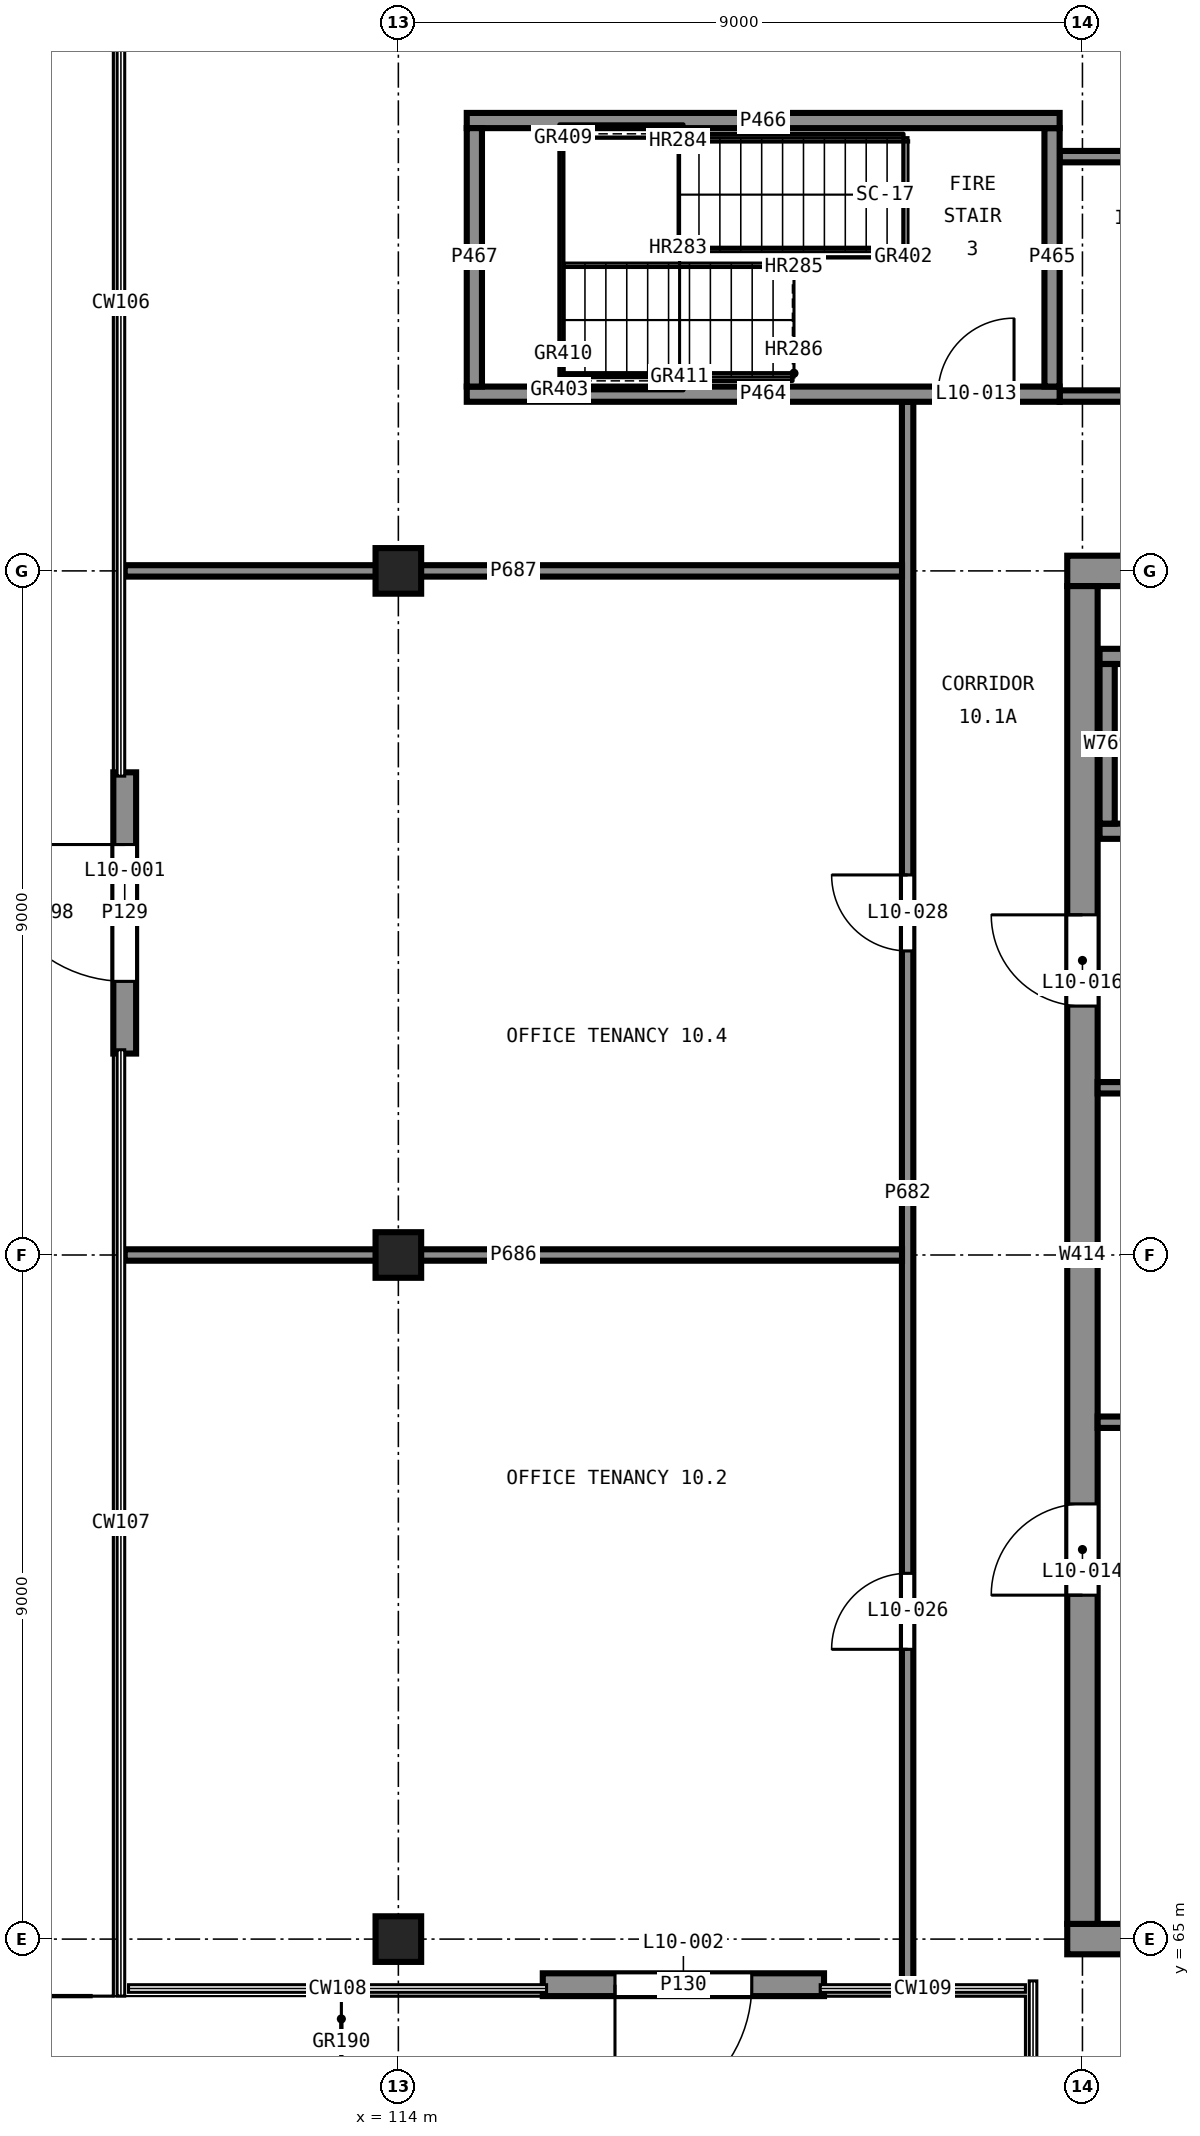
"""IFC4 building model, lengths in metres.
Left out: names, types, materials, properties, quantities, classifications, styles, units other than length and angle.
Written with IfcOpenShell. Run it as: python <this file> out.ifc"""

import sys

from ifc_helpers import new_model, si_unit, direction, frame, frame_2d, origin, origin_2d, place, context, subcontext, project, spatial, rectangle, extrude, element, fill, save


model = new_model("IFC4")
c1 = context("Model", 3, precision=1e-05, world=origin(), true_north=direction((0.0, 1.0)))
c2 = subcontext(c1, "Body", "Model", "MODEL_VIEW")
j1 = project(units=[si_unit("LENGTHUNIT", "METRE"), si_unit("PLANEANGLEUNIT", "RADIAN")], contexts=[c1])
p1 = place(None, origin())
s1 = spatial("IfcSite", under=j1, at=p1, CompositionType="ELEMENT")
p2 = place(p1, origin())
s2 = spatial("IfcBuilding", under=s1, at=p2, CompositionType="ELEMENT")
p3 = place(p2, frame((0.0, 0.0, 41.5)))
s3 = spatial("IfcBuildingStorey", under=s2, at=p3, CompositionType="ELEMENT", Elevation=41.5)
for number, where, z_axis, x_axis in (
    (1, (114.0, 65.0, 0.0), (0.0, 0.0, 1.0), (1.0, 0.0, 0.0)),
    (2, (114.0, 74.0, 0.0), (0.0, 0.0, 1.0), (1.0, 0.0, 0.0)),
    (3, (114.0, 83.0, 0.0), (0.0, 0.0, 1.0), (1.0, 0.0, 0.0)),
):
    element("IfcColumn", number, at=place(p3, frame(where, z_axis=z_axis, x_axis=x_axis)), inside=s3, PredefinedType="COLUMN", context=c2, shape_type="SweptSolid", body=[
        extrude(rectangle(XDim=0.6, YDim=0.6, at=origin_2d()), origin(), (0.0, 0.0, 1.0), 4.0),
    ])
for number, where, z_axis, x_axis in (
    (4, (122.8, 65.0, 0.0), (0.0, 0.0, 1.0), (1.0, 0.0, 0.0)),
    (5, (141.2, 83.0, 0.0), (0.0, 0.0, 1.0), (-1.0, 0.0, 0.0)),
):
    element("IfcWall", number, at=place(p3, frame(where, z_axis=z_axis, x_axis=x_axis)), inside=s3, PredefinedType="SHEAR", context=c2, shape_type="SweptSolid", body=[
        extrude(rectangle(XDim=18.4, YDim=0.4, at=frame_2d((9.2, 0.0))), origin(), (0.0, 0.0, 1.0), 4.0),
    ])
p4 = place(p3, frame((123.0, 82.8, 0.0), z_axis=(0.0, 0.0, 1.0), x_axis=(0.0, -1.0, 0.0)))
e6 = element("IfcWall", 6, at=p4, inside=s3, PredefinedType="SHEAR", context=c2, shape_type="SweptSolid", body=[
    extrude(rectangle(XDim=17.6, YDim=0.4, at=frame_2d((8.8, 0.0))), origin(), (0.0, 0.0, 1.0), 4.0),
])
p5 = place(p4, frame((12.075, 0.0, 0.0)))
e7 = element("IfcOpeningElement", 7, at=p5, cuts=e6, PredefinedType="OPENING", context=c2, shape_type="SweptSolid", body=[
    extrude(rectangle(XDim=1.2, YDim=2.1, at=frame_2d((0.6, 1.05))), frame((0.0, 0.21, 0.0), z_axis=(0.0, -1.0, 0.0), x_axis=(1.0, 0.0, 0.0)), (0.0, 0.0, 1.0), 0.42),
])
p6 = place(p4, frame((4.325, 0.0, 0.0)))
e8 = element("IfcOpeningElement", 8, at=p6, cuts=e6, PredefinedType="OPENING", context=c2, shape_type="SweptSolid", body=[
    extrude(rectangle(XDim=1.2, YDim=2.1, at=frame_2d((0.6, 1.05))), frame((0.0, 0.21, 0.0), z_axis=(0.0, -1.0, 0.0), x_axis=(1.0, 0.0, 0.0)), (0.0, 0.0, 1.0), 0.42),
])
p7 = place(p3, frame((110.4, 80.35, 0.0), z_axis=(0.0, 0.0, 1.0), x_axis=(0.0, -1.0, 0.0)))
e9 = element("IfcWall", 9, at=p7, inside=s3, PredefinedType="SOLIDWALL", context=c2, shape_type="SweptSolid", body=[
    extrude(rectangle(XDim=3.7, YDim=0.3, at=frame_2d((1.85, 0.0))), origin(), (0.0, 0.0, 1.0), 3.75),
])
p8 = place(p7, frame((0.95, 0.0, 0.0)))
e10 = element("IfcOpeningElement", 10, at=p8, cuts=e9, PredefinedType="OPENING", context=c2, shape_type="SweptSolid", body=[
    extrude(rectangle(XDim=1.8, YDim=2.4, at=frame_2d((0.9, 1.2))), frame((0.0, 0.16, 0.0), z_axis=(0.0, -1.0, 0.0), x_axis=(1.0, 0.0, 0.0)), (0.0, 0.0, 1.0), 0.32),
])
p9 = place(p3, frame((115.9, 64.4, 0.0), z_axis=(0.0, 0.0, 1.0), x_axis=(1.0, 0.0, 0.0)))
e11 = element("IfcWall", 11, at=p9, inside=s3, PredefinedType="SOLIDWALL", context=c2, shape_type="SweptSolid", body=[
    extrude(rectangle(XDim=3.7, YDim=0.3, at=frame_2d((1.85, 0.0))), origin(), (0.0, 0.0, 1.0), 3.75),
])
p10 = place(p9, frame((0.95, 0.0, 0.0)))
e12 = element("IfcOpeningElement", 12, at=p10, cuts=e11, PredefinedType="OPENING", context=c2, shape_type="SweptSolid", body=[
    extrude(rectangle(XDim=1.8, YDim=2.4, at=frame_2d((0.9, 1.2))), frame((0.0, 0.16, 0.0), z_axis=(0.0, -1.0, 0.0), x_axis=(1.0, 0.0, 0.0)), (0.0, 0.0, 1.0), 0.32),
])
p11 = place(p3, frame((123.225, 79.575, 0.0), z_axis=(0.0, 0.0, 1.0), x_axis=(1.0, 0.0, 0.0)))
e13 = element("IfcWall", 13, at=p11, inside=s3, PredefinedType="SHEAR", context=c2, shape_type="SweptSolid", body=[
    extrude(rectangle(XDim=2.55, YDim=0.2, at=frame_2d((1.275, 0.0))), origin(), (0.0, 0.0, 1.0), 4.0),
])
p12 = place(p11, frame((0.725, 0.0, 0.0)))
e14 = element("IfcOpeningElement", 14, at=p12, cuts=e13, PredefinedType="OPENING", context=c2, shape_type="SweptSolid", body=[
    extrude(rectangle(XDim=1.1, YDim=2.1, at=frame_2d((0.55, 1.05))), frame((0.0, 0.11, 0.0), z_axis=(0.0, -1.0, 0.0), x_axis=(1.0, 0.0, 0.0)), (0.0, 0.0, 1.0), 0.22),
])
p13 = place(p3, frame((125.775, 81.875, 0.0), z_axis=(0.0, 0.0, 1.0), x_axis=(-1.0, 0.0, 0.0)))
e15 = element("IfcWall", 15, at=p13, inside=s3, PredefinedType="SHEAR", context=c2, shape_type="SweptSolid", body=[
    extrude(rectangle(XDim=2.55, YDim=0.2, at=frame_2d((1.275, 0.0))), origin(), (0.0, 0.0, 1.0), 4.0),
])
p14 = place(p3, frame((123.325, 81.775, 0.0), z_axis=(0.0, 0.0, 1.0), x_axis=(0.0, -1.0, 0.0)))
e16 = element("IfcWall", 16, at=p14, inside=s3, PredefinedType="SHEAR", context=c2, shape_type="SweptSolid", body=[
    extrude(rectangle(XDim=2.1, YDim=0.2, at=frame_2d((1.05, 0.0))), origin(), (0.0, 0.0, 1.0), 4.0),
])
p15 = place(p3, frame((114.9, 85.325, 0.0), z_axis=(0.0, 0.0, 1.0), x_axis=(1.0, 0.0, 0.0)))
e17 = element("IfcWall", 17, at=p15, inside=s3, PredefinedType="SHEAR", context=c2, shape_type="SweptSolid", body=[
    extrude(rectangle(XDim=7.8, YDim=0.2, at=frame_2d((3.9, 0.0))), origin(), (0.0, 0.0, 1.0), 3.75),
])
p16 = place(p15, frame((6.2, 0.0, 0.0)))
e18 = element("IfcOpeningElement", 18, at=p16, cuts=e17, PredefinedType="OPENING", context=c2, shape_type="SweptSolid", body=[
    extrude(rectangle(XDim=1.0, YDim=2.1, at=frame_2d((0.5, 1.05))), frame((0.0, 0.11, 0.0), z_axis=(0.0, -1.0, 0.0), x_axis=(1.0, 0.0, 0.0)), (0.0, 0.0, 1.0), 0.22),
])
p17 = place(p3, frame((122.6, 85.425, 0.0), z_axis=(0.0, 0.0, 1.0), x_axis=(0.0, 1.0, 0.0)))
e19 = element("IfcWall", 19, at=p17, inside=s3, PredefinedType="SHEAR", context=c2, shape_type="SweptSolid", body=[
    extrude(rectangle(XDim=3.4, YDim=0.2, at=frame_2d((1.7, 0.0))), origin(), (0.0, 0.0, 1.0), 3.75),
])
p18 = place(p3, frame((122.7, 88.925, 0.0), z_axis=(0.0, 0.0, 1.0), x_axis=(-1.0, 0.0, 0.0)))
e20 = element("IfcWall", 20, at=p18, inside=s3, PredefinedType="SHEAR", context=c2, shape_type="SweptSolid", body=[
    extrude(rectangle(XDim=7.8, YDim=0.2, at=frame_2d((3.9, 0.0))), origin(), (0.0, 0.0, 1.0), 3.75),
])
p19 = place(p3, frame((115.0, 88.825, 0.0), z_axis=(0.0, 0.0, 1.0), x_axis=(0.0, -1.0, 0.0)))
e21 = element("IfcWall", 21, at=p19, inside=s3, PredefinedType="SHEAR", context=c2, shape_type="SweptSolid", body=[
    extrude(rectangle(XDim=3.4, YDim=0.2, at=frame_2d((1.7, 0.0))), origin(), (0.0, 0.0, 1.0), 3.75),
])
p20 = place(p3, frame((123.2, 71.8, 0.0), z_axis=(0.0, 0.0, 1.0), x_axis=(1.0, 0.0, 0.0)))
e22 = element("IfcWall", 22, at=p20, inside=s3, PredefinedType="PARTITIONING", context=c2, shape_type="SweptSolid", body=[
    extrude(rectangle(XDim=1.95, YDim=0.15, at=frame_2d((0.975, 0.0))), origin(), (0.0, 0.0, 1.0), 3.75),
])
p21 = place(p20, frame((0.575, 0.0, 0.0)))
e23 = element("IfcOpeningElement", 23, at=p21, cuts=e22, PredefinedType="OPENING", context=c2, shape_type="SweptSolid", body=[
    extrude(rectangle(XDim=0.9, YDim=2.1, at=frame_2d((0.45, 1.05))), frame((0.0, 0.085, 0.0), z_axis=(0.0, -1.0, 0.0), x_axis=(1.0, 0.0, 0.0)), (0.0, 0.0, 1.0), 0.17),
])
p22 = place(p3, frame((123.2, 76.2, 0.0), z_axis=(0.0, 0.0, 1.0), x_axis=(1.0, 0.0, 0.0)))
e24 = element("IfcWall", 24, at=p22, inside=s3, PredefinedType="PARTITIONING", context=c2, shape_type="SweptSolid", body=[
    extrude(rectangle(XDim=1.95, YDim=0.15, at=frame_2d((0.975, 0.0))), origin(), (0.0, 0.0, 1.0), 3.75),
])
p23 = place(p3, frame((120.7, 64.4, 0.0), z_axis=(0.0, 0.0, 1.0), x_axis=(0.0, 1.0, 0.0)))
e25 = element("IfcWall", 25, at=p23, inside=s3, PredefinedType="PARTITIONING", context=c2, shape_type="SweptSolid", body=[
    extrude(rectangle(XDim=20.825, YDim=0.15, at=frame_2d((10.413, 0.0))), origin(), (0.0, 0.0, 1.0), 3.75),
])
p24 = place(p23, frame((4.413, 0.0, 0.0)))
e26 = element("IfcOpeningElement", 26, at=p24, cuts=e25, PredefinedType="OPENING", context=c2, shape_type="SweptSolid", body=[
    extrude(rectangle(XDim=1.0, YDim=2.1, at=frame_2d((0.5, 1.05))), frame((0.0, 0.085, 0.0), z_axis=(0.0, -1.0, 0.0), x_axis=(1.0, 0.0, 0.0)), (0.0, 0.0, 1.0), 0.17),
])
p25 = place(p23, frame((13.6, 0.0, 0.0)))
e27 = element("IfcOpeningElement", 27, at=p25, cuts=e25, PredefinedType="OPENING", context=c2, shape_type="SweptSolid", body=[
    extrude(rectangle(XDim=1.0, YDim=2.1, at=frame_2d((0.5, 1.05))), frame((0.0, 0.085, 0.0), z_axis=(0.0, -1.0, 0.0), x_axis=(1.0, 0.0, 0.0)), (0.0, 0.0, 1.0), 0.17),
])
p26 = place(p3, frame((122.7, 85.3, 0.0), z_axis=(0.0, 0.0, 1.0), x_axis=(1.0, 0.0, 0.0)))
e28 = element("IfcWall", 28, at=p26, inside=s3, PredefinedType="PARTITIONING", context=c2, shape_type="SweptSolid", body=[
    extrude(rectangle(XDim=9.9, YDim=0.15, at=frame_2d((4.95, 0.0))), origin(), (0.0, 0.0, 1.0), 3.75),
])
p27 = place(p26, frame((1.35, 0.0, 0.0)))
e29 = element("IfcOpeningElement", 29, at=p27, cuts=e28, PredefinedType="OPENING", context=c2, shape_type="SweptSolid", body=[
    extrude(rectangle(XDim=1.0, YDim=2.1, at=frame_2d((0.5, 1.05))), frame((0.0, 0.085, 0.0), z_axis=(0.0, -1.0, 0.0), x_axis=(1.0, 0.0, 0.0)), (0.0, 0.0, 1.0), 0.17),
])
p28 = place(p26, frame((6.335, 0.0, 0.0)))
e30 = element("IfcOpeningElement", 30, at=p28, cuts=e28, PredefinedType="OPENING", context=c2, shape_type="SweptSolid", body=[
    extrude(rectangle(XDim=1.0, YDim=2.1, at=frame_2d((0.5, 1.05))), frame((0.0, 0.085, 0.0), z_axis=(0.0, -1.0, 0.0), x_axis=(1.0, 0.0, 0.0)), (0.0, 0.0, 1.0), 0.17),
])
for number, where, z_axis, x_axis in (
    (31, (110.4, 74.0, 0.0), (0.0, 0.0, 1.0), (1.0, 0.0, 0.0)),
    (32, (110.4, 83.0, 0.0), (0.0, 0.0, 1.0), (1.0, 0.0, 0.0)),
):
    element("IfcWall", number, at=place(p3, frame(where, z_axis=z_axis, x_axis=x_axis)), inside=s3, PredefinedType="PARTITIONING", context=c2, shape_type="SweptSolid", body=[
        extrude(rectangle(XDim=10.226, YDim=0.15, at=frame_2d((5.113, 0.0))), origin(), (0.0, 0.0, 1.0), 2.85),
    ])
p29 = place(p3, frame((122.7, 88.45, 0.0), z_axis=(0.0, 0.0, 1.0), x_axis=(1.0, 0.0, 0.0)))
e33 = element("IfcWall", 33, at=p29, inside=s3, PredefinedType="PARTITIONING", context=c2, shape_type="SweptSolid", body=[
    extrude(rectangle(XDim=3.65, YDim=0.15, at=frame_2d((1.825, 0.0))), origin(), (0.0, 0.0, 1.0), 3.75),
])
p30 = place(p8, frame((1.8, 0.0, 0.0), z_axis=(0.0, 0.0, 1.0), x_axis=(-1.0, 0.0, 0.0)))
e34 = element("IfcDoor", 34, at=p30, inside=s3, OperationType="DOUBLE_DOOR_SINGLE_SWING", PredefinedType="DOOR", context=c2, shape_type="SweptSolid", body=[
    extrude(rectangle(XDim=1.8, YDim=2.4, at=frame_2d((0.9, 1.2))), frame((0.0, 0.025, 0.0), z_axis=(0.0, -1.0, 0.0), x_axis=(1.0, 0.0, 0.0)), (0.0, 0.0, 1.0), 0.05),
])
fill(e10, e34)
p31 = place(p10, frame((1.8, 0.0, 0.0), z_axis=(0.0, 0.0, 1.0), x_axis=(-1.0, 0.0, 0.0)))
e35 = element("IfcDoor", 35, at=p31, inside=s3, OperationType="DOUBLE_DOOR_SINGLE_SWING", PredefinedType="DOOR", context=c2, shape_type="SweptSolid", body=[
    extrude(rectangle(XDim=1.8, YDim=2.4, at=frame_2d((0.9, 1.2))), frame((0.0, 0.025, 0.0), z_axis=(0.0, -1.0, 0.0), x_axis=(1.0, 0.0, 0.0)), (0.0, 0.0, 1.0), 0.05),
])
fill(e12, e35)
p32 = place(p16, origin())
e36 = element("IfcDoor", 36, at=p32, inside=s3, OperationType="SINGLE_SWING_LEFT", PredefinedType="DOOR", context=c2, shape_type="SweptSolid", body=[
    extrude(rectangle(XDim=1.0, YDim=2.1, at=frame_2d((0.5, 1.05))), frame((0.0, 0.025, 0.0), z_axis=(0.0, -1.0, 0.0), x_axis=(1.0, 0.0, 0.0)), (0.0, 0.0, 1.0), 0.05),
])
fill(e18, e36)
p33 = place(p5, frame((1.2, 0.0, 0.0), z_axis=(0.0, 0.0, 1.0), x_axis=(-1.0, 0.0, 0.0)))
e37 = element("IfcDoor", 37, at=p33, inside=s3, OperationType="SINGLE_SWING_RIGHT", PredefinedType="DOOR", context=c2, shape_type="SweptSolid", body=[
    extrude(rectangle(XDim=1.2, YDim=2.1, at=frame_2d((0.6, 1.05))), frame((0.0, 0.025, 0.0), z_axis=(0.0, -1.0, 0.0), x_axis=(1.0, 0.0, 0.0)), (0.0, 0.0, 1.0), 0.05),
])
fill(e7, e37)
p34 = place(p6, frame((1.2, 0.0, 0.0), z_axis=(0.0, 0.0, 1.0), x_axis=(-1.0, 0.0, 0.0)))
e38 = element("IfcDoor", 38, at=p34, inside=s3, OperationType="SINGLE_SWING_LEFT", PredefinedType="DOOR", context=c2, shape_type="SweptSolid", body=[
    extrude(rectangle(XDim=1.2, YDim=2.1, at=frame_2d((0.6, 1.05))), frame((0.0, 0.025, 0.0), z_axis=(0.0, -1.0, 0.0), x_axis=(1.0, 0.0, 0.0)), (0.0, 0.0, 1.0), 0.05),
])
fill(e8, e38)
p35 = place(p24, origin())
e39 = element("IfcDoor", 39, at=p35, inside=s3, OperationType="SINGLE_SWING_RIGHT", PredefinedType="DOOR", context=c2, shape_type="SweptSolid", body=[
    extrude(rectangle(XDim=1.0, YDim=2.1, at=frame_2d((0.5, 1.05))), frame((0.0, 0.025, 0.0), z_axis=(0.0, -1.0, 0.0), x_axis=(1.0, 0.0, 0.0)), (0.0, 0.0, 1.0), 0.05),
])
fill(e26, e39)
p36 = place(p25, origin())
e40 = element("IfcDoor", 40, at=p36, inside=s3, OperationType="SINGLE_SWING_LEFT", PredefinedType="DOOR", context=c2, shape_type="SweptSolid", body=[
    extrude(rectangle(XDim=1.0, YDim=2.1, at=frame_2d((0.5, 1.05))), frame((0.0, 0.025, 0.0), z_axis=(0.0, -1.0, 0.0), x_axis=(1.0, 0.0, 0.0)), (0.0, 0.0, 1.0), 0.05),
])
fill(e27, e40)
save(model, sys.argv[1])
